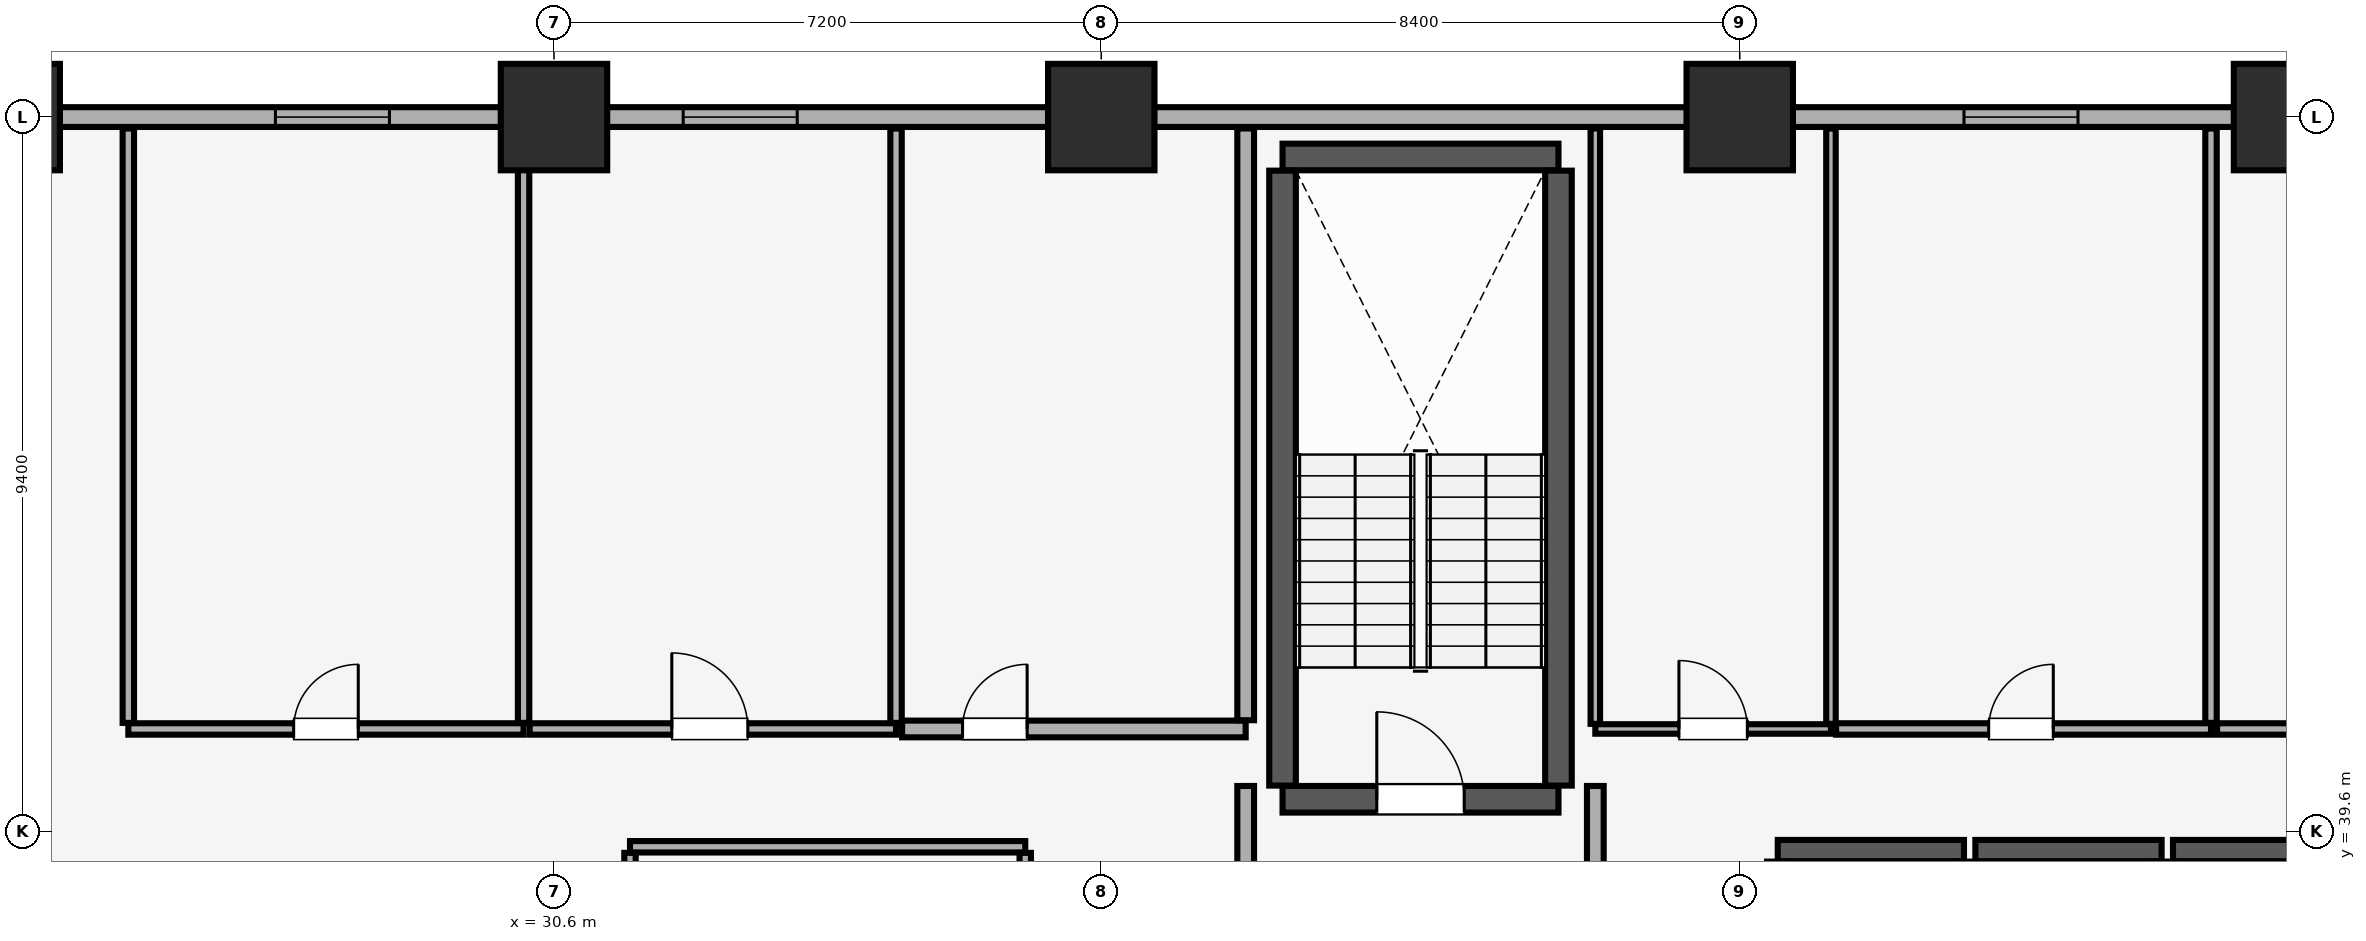
"""IFC4 building model, lengths in metres.
Left out: names, types, materials, properties, quantities, classifications, styles, units other than length and angle.
Written with IfcOpenShell. Run it as: python <this file> out.ifc"""

import sys

from ifc_helpers import new_model, si_unit, direction, frame, frame_2d, origin, origin_2d, place, context, subcontext, project, spatial, rectangle, extrude, element, fill, save


model = new_model("IFC4")
c1 = context("Model", 3, precision=1e-05, world=origin(), true_north=direction((0.0, 1.0)))
c2 = subcontext(c1, "Body", "Model", "MODEL_VIEW")
j1 = project(units=[si_unit("LENGTHUNIT", "METRE"), si_unit("PLANEANGLEUNIT", "RADIAN")], contexts=[c1])
p1 = place(None, origin())
s1 = spatial("IfcSite", under=j1, at=p1, CompositionType="ELEMENT")
p2 = place(p1, origin())
s2 = spatial("IfcBuilding", under=s1, at=p2, CompositionType="ELEMENT")
p3 = place(p2, frame((0.0, 0.0, 35.15)))
s3 = spatial("IfcBuildingStorey", under=s2, at=p3, CompositionType="ELEMENT", Elevation=35.15)
for number, where, z_axis, x_axis in (
    (1, (23.4, 49.0, 0.0), (0.0, 0.0, 1.0), (1.0, 0.0, 0.0)),
    (2, (30.6, 49.0, 0.0), (0.0, 0.0, 1.0), (1.0, 0.0, 0.0)),
    (3, (37.8, 49.0, 0.0), (0.0, 0.0, 1.0), (1.0, 0.0, 0.0)),
    (4, (46.2, 49.0, 0.0), (0.0, 0.0, 1.0), (1.0, 0.0, 0.0)),
    (5, (53.4, 49.0, 0.0), (0.0, 0.0, 1.0), (1.0, 0.0, 0.0)),
):
    element("IfcColumn", number, at=place(p3, frame(where, z_axis=z_axis, x_axis=x_axis)), inside=s3, PredefinedType="COLUMN", context=c2, shape_type="SweptSolid", body=[
        extrude(rectangle(XDim=1.4, YDim=1.4, at=origin_2d()), origin(), (0.0, 0.0, 1.0), 3.51),
    ])
p4 = place(p3, frame((79.8, 49.0, 0.0), z_axis=(0.0, 0.0, 1.0), x_axis=(-1.0, 0.0, 0.0)))
e6 = element("IfcWall", 6, at=p4, inside=s3, PredefinedType="SOLIDWALL", context=c2, shape_type="SweptSolid", body=[
    extrude(rectangle(XDim=75.6, YDim=0.26, at=frame_2d((37.8, 0.0))), origin(), (0.0, 0.0, 1.0), 2.56),
])
p5 = place(p4, frame((72.565, 0.0, 0.85)))
e7 = element("IfcOpeningElement", 7, at=p5, cuts=e6, PredefinedType="OPENING", context=c2, shape_type="SweptSolid", body=[
    extrude(rectangle(XDim=1.5, YDim=1.4, at=frame_2d((0.75, 0.7))), frame((0.0, 0.14, 0.0), z_axis=(0.0, -1.0, 0.0), x_axis=(1.0, 0.0, 0.0)), (0.0, 0.0, 1.0), 0.28),
])
p6 = place(p4, frame((67.45, 0.0, 0.85)))
e8 = element("IfcOpeningElement", 8, at=p6, cuts=e6, PredefinedType="OPENING", context=c2, shape_type="SweptSolid", body=[
    extrude(rectangle(XDim=1.5, YDim=1.4, at=frame_2d((0.75, 0.7))), frame((0.0, 0.14, 0.0), z_axis=(0.0, -1.0, 0.0), x_axis=(1.0, 0.0, 0.0)), (0.0, 0.0, 1.0), 0.28),
])
p7 = place(p4, frame((6.65, 0.0, 0.85)))
e9 = element("IfcOpeningElement", 9, at=p7, cuts=e6, PredefinedType="OPENING", context=c2, shape_type="SweptSolid", body=[
    extrude(rectangle(XDim=1.5, YDim=1.4, at=frame_2d((0.75, 0.7))), frame((0.0, 0.14, 0.0), z_axis=(0.0, -1.0, 0.0), x_axis=(1.0, 0.0, 0.0)), (0.0, 0.0, 1.0), 0.28),
])
p8 = place(p4, frame((1.535, 0.0, 0.85)))
e10 = element("IfcOpeningElement", 10, at=p8, cuts=e6, PredefinedType="OPENING", context=c2, shape_type="SweptSolid", body=[
    extrude(rectangle(XDim=1.5, YDim=1.4, at=frame_2d((0.75, 0.7))), frame((0.0, 0.14, 0.0), z_axis=(0.0, -1.0, 0.0), x_axis=(1.0, 0.0, 0.0)), (0.0, 0.0, 1.0), 0.28),
])
p9 = place(p4, frame((51.365, 0.0, 0.9)))
e11 = element("IfcOpeningElement", 11, at=p9, cuts=e6, PredefinedType="OPENING", context=c2, shape_type="SweptSolid", body=[
    extrude(rectangle(XDim=1.5, YDim=1.4, at=frame_2d((0.75, 0.7))), frame((0.0, 0.14, 0.0), z_axis=(0.0, -1.0, 0.0), x_axis=(1.0, 0.0, 0.0)), (0.0, 0.0, 1.0), 0.28),
])
p10 = place(p4, frame((46.0, 0.0, 0.9)))
e12 = element("IfcOpeningElement", 12, at=p10, cuts=e6, PredefinedType="OPENING", context=c2, shape_type="SweptSolid", body=[
    extrude(rectangle(XDim=1.5, YDim=1.4, at=frame_2d((0.75, 0.7))), frame((0.0, 0.14, 0.0), z_axis=(0.0, -1.0, 0.0), x_axis=(1.0, 0.0, 0.0)), (0.0, 0.0, 1.0), 0.28),
])
p11 = place(p4, frame((29.15, 0.0, 0.9)))
e13 = element("IfcOpeningElement", 13, at=p11, cuts=e6, PredefinedType="OPENING", context=c2, shape_type="SweptSolid", body=[
    extrude(rectangle(XDim=1.5, YDim=1.4, at=frame_2d((0.75, 0.7))), frame((0.0, 0.14, 0.0), z_axis=(0.0, -1.0, 0.0), x_axis=(1.0, 0.0, 0.0)), (0.0, 0.0, 1.0), 0.28),
])
p12 = place(p4, frame((23.485, 0.0, 0.9)))
e14 = element("IfcOpeningElement", 14, at=p12, cuts=e6, PredefinedType="OPENING", context=c2, shape_type="SweptSolid", body=[
    extrude(rectangle(XDim=1.5, YDim=1.4, at=frame_2d((0.75, 0.7))), frame((0.0, 0.14, 0.0), z_axis=(0.0, -1.0, 0.0), x_axis=(1.0, 0.0, 0.0)), (0.0, 0.0, 1.0), 0.28),
])
p13 = place(p3, frame((40.185, 40.025, 0.0), z_axis=(0.0, 0.0, 1.0), x_axis=(1.0, 0.0, 0.0)))
e15 = element("IfcWall", 15, at=p13, inside=s3, PredefinedType="SHEAR", context=c2, shape_type="SweptSolid", body=[
    extrude(rectangle(XDim=3.63, YDim=0.35, at=frame_2d((1.815, 0.0))), origin(), (0.0, 0.0, 1.0), 3.51),
])
p14 = place(p13, frame((1.24, 0.0, 0.0)))
e16 = element("IfcOpeningElement", 16, at=p14, cuts=e15, PredefinedType="OPENING", context=c2, shape_type="SweptSolid", body=[
    extrude(rectangle(XDim=1.15, YDim=2.15, at=frame_2d((0.575, 1.075))), frame((0.0, 0.185, 0.0), z_axis=(0.0, -1.0, 0.0), x_axis=(1.0, 0.0, 0.0)), (0.0, 0.0, 1.0), 0.37),
])
p15 = place(p3, frame((40.185, 48.475, 0.0), z_axis=(0.0, 0.0, 1.0), x_axis=(1.0, 0.0, 0.0)))
e17 = element("IfcWall", 17, at=p15, inside=s3, PredefinedType="SHEAR", context=c2, shape_type="SweptSolid", body=[
    extrude(rectangle(XDim=3.63, YDim=0.35, at=frame_2d((1.815, 0.0))), origin(), (0.0, 0.0, 1.0), 3.51),
])
for number, where, z_axis, x_axis in (
    (18, (40.185, 40.205, 0.0), (0.0, 0.0, 1.0), (0.0, 1.0, 0.0)),
    (19, (43.815, 40.205, 0.0), (0.0, 0.0, 1.0), (0.0, 1.0, 0.0)),
):
    element("IfcWall", number, at=place(p3, frame(where, z_axis=z_axis, x_axis=x_axis)), inside=s3, PredefinedType="SHEAR", context=c2, shape_type="SweptSolid", body=[
        extrude(rectangle(XDim=8.09, YDim=0.35, at=frame_2d((4.045, 0.0))), origin(), (0.0, 0.0, 1.0), 3.51),
    ])
p16 = place(p3, frame((46.7, 39.35, 0.0), z_axis=(0.0, 0.0, 1.0), x_axis=(1.0, 0.0, 0.0)))
e20 = element("IfcWall", 20, at=p16, inside=s3, PredefinedType="SHEAR", context=c2, shape_type="SweptSolid", body=[
    extrude(rectangle(XDim=2.45, YDim=0.28, at=frame_2d((1.225, 0.0))), origin(), (0.0, 0.0, 1.0), 3.51),
])
for number, where, z_axis, x_axis in (
    (21, (46.7, 37.145, 0.0), (0.0, 0.0, 1.0), (0.0, 1.0, 0.0)),
    (22, (49.15, 37.145, 0.0), (0.0, 0.0, 1.0), (0.0, 1.0, 0.0)),
):
    element("IfcWall", number, at=place(p3, frame(where, z_axis=z_axis, x_axis=x_axis)), inside=s3, PredefinedType="SHEAR", context=c2, shape_type="SweptSolid", body=[
        extrude(rectangle(XDim=2.06, YDim=0.28, at=frame_2d((1.03, 0.0))), origin(), (0.0, 0.0, 1.0), 3.51),
    ])
p17 = place(p3, frame((49.3, 39.35, 0.0), z_axis=(0.0, 0.0, 1.0), x_axis=(1.0, 0.0, 0.0)))
e23 = element("IfcWall", 23, at=p17, inside=s3, PredefinedType="SHEAR", context=c2, shape_type="SweptSolid", body=[
    extrude(rectangle(XDim=2.45, YDim=0.28, at=frame_2d((1.225, 0.0))), origin(), (0.0, 0.0, 1.0), 3.51),
])
p18 = place(p3, frame((51.75, 37.145, 0.0), z_axis=(0.0, 0.0, 1.0), x_axis=(0.0, 1.0, 0.0)))
e24 = element("IfcWall", 24, at=p18, inside=s3, PredefinedType="SHEAR", context=c2, shape_type="SweptSolid", body=[
    extrude(rectangle(XDim=2.06, YDim=0.28, at=frame_2d((1.03, 0.0))), origin(), (0.0, 0.0, 1.0), 3.51),
])
p19 = place(p3, frame((51.9, 39.35, 0.0), z_axis=(0.0, 0.0, 1.0), x_axis=(1.0, 0.0, 0.0)))
e25 = element("IfcWall", 25, at=p19, inside=s3, PredefinedType="SHEAR", context=c2, shape_type="SweptSolid", body=[
    extrude(rectangle(XDim=2.59, YDim=0.28, at=frame_2d((1.295, 0.0))), origin(), (0.0, 0.0, 1.0), 3.51),
])
for number, where, z_axis, x_axis in (
    (26, (39.7, 34.415, 0.0), (0.0, 0.0, 1.0), (0.0, 1.0, 0.0)),
    (27, (44.3, 34.415, 0.0), (0.0, 0.0, 1.0), (0.0, 1.0, 0.0)),
):
    element("IfcWall", number, at=place(p3, frame(where, z_axis=z_axis, x_axis=x_axis)), inside=s3, PredefinedType="PARTITIONING", context=c2, shape_type="SweptSolid", body=[
        extrude(rectangle(XDim=5.785, YDim=0.22, at=frame_2d((2.893, 0.0))), origin(), (0.0, 0.0, 1.0), 3.51),
    ])
p20 = place(p3, frame((31.6, 39.4, 0.0), z_axis=(0.0, 0.0, 1.0), x_axis=(1.0, 0.0, 0.0)))
e28 = element("IfcWall", 28, at=p20, inside=s3, PredefinedType="PARTITIONING", context=c2, shape_type="SweptSolid", body=[
    extrude(rectangle(XDim=5.2, YDim=0.15, at=frame_2d((2.6, 0.0))), origin(), (0.0, 0.0, 1.0), 3.51),
])
for number, where, z_axis, x_axis in (
    (29, (31.6, 34.38, 0.0), (0.0, 0.0, 1.0), (0.0, 1.0, 0.0)),
    (30, (36.8, 34.38, 0.0), (0.0, 0.0, 1.0), (0.0, 1.0, 0.0)),
):
    element("IfcWall", number, at=place(p3, frame(where, z_axis=z_axis, x_axis=x_axis)), inside=s3, PredefinedType="PARTITIONING", context=c2, shape_type="SweptSolid", body=[
        extrude(rectangle(XDim=4.94, YDim=0.15, at=frame_2d((2.47, 0.0))), origin(), (0.0, 0.0, 1.0), 3.51),
    ])
p21 = place(p3, frame((25.0, 40.95, 0.0), z_axis=(0.0, 0.0, 1.0), x_axis=(1.0, 0.0, 0.0)))
e31 = element("IfcWall", 31, at=p21, inside=s3, PredefinedType="PARTITIONING", context=c2, shape_type="SweptSolid", body=[
    extrude(rectangle(XDim=5.2, YDim=0.15, at=frame_2d((2.6, 0.0))), origin(), (0.0, 0.0, 1.0), 3.51),
])
p22 = place(p21, frame((2.175, 0.0, 0.0)))
e32 = element("IfcOpeningElement", 32, at=p22, cuts=e31, PredefinedType="OPENING", context=c2, shape_type="SweptSolid", body=[
    extrude(rectangle(XDim=0.85, YDim=2.1, at=frame_2d((0.425, 1.05))), frame((0.0, 0.085, 0.0), z_axis=(0.0, -1.0, 0.0), x_axis=(1.0, 0.0, 0.0)), (0.0, 0.0, 1.0), 0.17),
])
for number, where, z_axis, x_axis in (
    (33, (25.0, 41.03, 0.0), (0.0, 0.0, 1.0), (0.0, 1.0, 0.0)),
    (34, (30.2, 41.03, 0.0), (0.0, 0.0, 1.0), (0.0, 1.0, 0.0)),
):
    element("IfcWall", number, at=place(p3, frame(where, z_axis=z_axis, x_axis=x_axis)), inside=s3, PredefinedType="PARTITIONING", context=c2, shape_type="SweptSolid", body=[
        extrude(rectangle(XDim=7.82, YDim=0.15, at=frame_2d((3.91, 0.0))), origin(), (0.0, 0.0, 1.0), 3.51),
    ])
p23 = place(p3, frame((30.28, 40.95, 0.0), z_axis=(0.0, 0.0, 1.0), x_axis=(1.0, 0.0, 0.0)))
e35 = element("IfcWall", 35, at=p23, inside=s3, PredefinedType="PARTITIONING", context=c2, shape_type="SweptSolid", body=[
    extrude(rectangle(XDim=4.82, YDim=0.15, at=frame_2d((2.41, 0.0))), origin(), (0.0, 0.0, 1.0), 3.51),
])
p24 = place(p23, frame((1.87, 0.0, 0.0)))
e36 = element("IfcOpeningElement", 36, at=p24, cuts=e35, PredefinedType="OPENING", context=c2, shape_type="SweptSolid", body=[
    extrude(rectangle(XDim=1.0, YDim=2.15, at=frame_2d((0.5, 1.075))), frame((0.0, 0.085, 0.0), z_axis=(0.0, -1.0, 0.0), x_axis=(1.0, 0.0, 0.0)), (0.0, 0.0, 1.0), 0.17),
])
p25 = place(p3, frame((35.1, 41.03, 0.0), z_axis=(0.0, 0.0, 1.0), x_axis=(0.0, 1.0, 0.0)))
e37 = element("IfcWall", 37, at=p25, inside=s3, PredefinedType="PARTITIONING", context=c2, shape_type="SweptSolid", body=[
    extrude(rectangle(XDim=7.82, YDim=0.15, at=frame_2d((3.91, 0.0))), origin(), (0.0, 0.0, 1.0), 3.51),
])
p26 = place(p3, frame((35.18, 40.95, 0.0), z_axis=(0.0, 0.0, 1.0), x_axis=(1.0, 0.0, 0.0)))
e38 = element("IfcWall", 38, at=p26, inside=s3, PredefinedType="PARTITIONING", context=c2, shape_type="SweptSolid", body=[
    extrude(rectangle(XDim=4.52, YDim=0.22, at=frame_2d((2.26, 0.0))), origin(), (0.0, 0.0, 1.0), 3.51),
])
p27 = place(p26, frame((0.795, 0.0, 0.0)))
e39 = element("IfcOpeningElement", 39, at=p27, cuts=e38, PredefinedType="OPENING", context=c2, shape_type="SweptSolid", body=[
    extrude(rectangle(XDim=0.85, YDim=2.1, at=frame_2d((0.425, 1.05))), frame((0.0, 0.12, 0.0), z_axis=(0.0, -1.0, 0.0), x_axis=(1.0, 0.0, 0.0)), (0.0, 0.0, 1.0), 0.24),
])
p28 = place(p3, frame((39.7, 41.065, 0.0), z_axis=(0.0, 0.0, 1.0), x_axis=(0.0, 1.0, 0.0)))
e40 = element("IfcWall", 40, at=p28, inside=s3, PredefinedType="PARTITIONING", context=c2, shape_type="SweptSolid", body=[
    extrude(rectangle(XDim=7.785, YDim=0.22, at=frame_2d((3.893, 0.0))), origin(), (0.0, 0.0, 1.0), 3.51),
])
p29 = place(p3, frame((44.3, 40.95, 0.0), z_axis=(0.0, 0.0, 1.0), x_axis=(1.0, 0.0, 0.0)))
e41 = element("IfcWall", 41, at=p29, inside=s3, PredefinedType="PARTITIONING", context=c2, shape_type="SweptSolid", body=[
    extrude(rectangle(XDim=3.1, YDim=0.125, at=frame_2d((1.55, 0.0))), origin(), (0.0, 0.0, 1.0), 3.51),
])
p30 = place(p29, frame((1.1, 0.0, 0.0)))
e42 = element("IfcOpeningElement", 42, at=p30, cuts=e41, PredefinedType="OPENING", context=c2, shape_type="SweptSolid", body=[
    extrude(rectangle(XDim=0.9, YDim=2.1, at=frame_2d((0.45, 1.05))), frame((0.0, 0.073, 0.0), z_axis=(0.0, -1.0, 0.0), x_axis=(1.0, 0.0, 0.0)), (0.0, 0.0, 1.0), 0.145),
])
for number, where, z_axis, x_axis in (
    (43, (44.3, 41.018, 0.0), (0.0, 0.0, 1.0), (0.0, 1.0, 0.0)),
    (44, (47.4, 41.018, 0.0), (0.0, 0.0, 1.0), (0.0, 1.0, 0.0)),
):
    element("IfcWall", number, at=place(p3, frame(where, z_axis=z_axis, x_axis=x_axis)), inside=s3, PredefinedType="PARTITIONING", context=c2, shape_type="SweptSolid", body=[
        extrude(rectangle(XDim=7.833, YDim=0.125, at=frame_2d((3.916, 0.0))), origin(), (0.0, 0.0, 1.0), 3.51),
    ])
p31 = place(p3, frame((47.468, 40.95, 0.0), z_axis=(0.0, 0.0, 1.0), x_axis=(1.0, 0.0, 0.0)))
e45 = element("IfcWall", 45, at=p31, inside=s3, PredefinedType="PARTITIONING", context=c2, shape_type="SweptSolid", body=[
    extrude(rectangle(XDim=4.932, YDim=0.15, at=frame_2d((2.466, 0.0))), origin(), (0.0, 0.0, 1.0), 3.51),
])
p32 = place(p31, frame((2.008, 0.0, 0.0)))
e46 = element("IfcOpeningElement", 46, at=p32, cuts=e45, PredefinedType="OPENING", context=c2, shape_type="SweptSolid", body=[
    extrude(rectangle(XDim=0.85, YDim=2.1, at=frame_2d((0.425, 1.05))), frame((0.0, 0.085, 0.0), z_axis=(0.0, -1.0, 0.0), x_axis=(1.0, 0.0, 0.0)), (0.0, 0.0, 1.0), 0.17),
])
p33 = place(p3, frame((52.4, 41.03, 0.0), z_axis=(0.0, 0.0, 1.0), x_axis=(0.0, 1.0, 0.0)))
e47 = element("IfcWall", 47, at=p33, inside=s3, PredefinedType="PARTITIONING", context=c2, shape_type="SweptSolid", body=[
    extrude(rectangle(XDim=7.82, YDim=0.15, at=frame_2d((3.91, 0.0))), origin(), (0.0, 0.0, 1.0), 3.51),
])
p34 = place(p3, frame((52.48, 40.95, 0.0), z_axis=(0.0, 0.0, 1.0), x_axis=(1.0, 0.0, 0.0)))
e48 = element("IfcWall", 48, at=p34, inside=s3, PredefinedType="PARTITIONING", context=c2, shape_type="SweptSolid", body=[
    extrude(rectangle(XDim=5.02, YDim=0.15, at=frame_2d((2.51, 0.0))), origin(), (0.0, 0.0, 1.0), 3.51),
])
p35 = place(p34, frame((2.045, 0.0, 0.0)))
e49 = element("IfcOpeningElement", 49, at=p35, cuts=e48, PredefinedType="OPENING", context=c2, shape_type="SweptSolid", body=[
    extrude(rectangle(XDim=0.85, YDim=2.1, at=frame_2d((0.425, 1.05))), frame((0.0, 0.085, 0.0), z_axis=(0.0, -1.0, 0.0), x_axis=(1.0, 0.0, 0.0)), (0.0, 0.0, 1.0), 0.17),
])
p36 = place(p9, origin())
e50 = element("IfcWindow", 50, at=p36, inside=s3, PartitioningType="SINGLE_PANEL", PredefinedType="WINDOW", context=c2, shape_type="SweptSolid", body=[
    extrude(rectangle(XDim=1.5, YDim=1.4, at=frame_2d((0.75, 0.7))), frame((0.0, 0.03, 0.0), z_axis=(0.0, -1.0, 0.0), x_axis=(1.0, 0.0, 0.0)), (0.0, 0.0, 1.0), 0.06),
])
fill(e11, e50)
p37 = place(p10, origin())
e51 = element("IfcWindow", 51, at=p37, inside=s3, PartitioningType="SINGLE_PANEL", PredefinedType="WINDOW", context=c2, shape_type="SweptSolid", body=[
    extrude(rectangle(XDim=1.5, YDim=1.4, at=frame_2d((0.75, 0.7))), frame((0.0, 0.03, 0.0), z_axis=(0.0, -1.0, 0.0), x_axis=(1.0, 0.0, 0.0)), (0.0, 0.0, 1.0), 0.06),
])
fill(e12, e51)
p38 = place(p11, origin())
e52 = element("IfcWindow", 52, at=p38, inside=s3, PartitioningType="SINGLE_PANEL", PredefinedType="WINDOW", context=c2, shape_type="SweptSolid", body=[
    extrude(rectangle(XDim=1.5, YDim=1.4, at=frame_2d((0.75, 0.7))), frame((0.0, 0.03, 0.0), z_axis=(0.0, -1.0, 0.0), x_axis=(1.0, 0.0, 0.0)), (0.0, 0.0, 1.0), 0.06),
])
fill(e13, e52)
p39 = place(p14, origin())
e53 = element("IfcDoor", 53, at=p39, inside=s3, OperationType="SINGLE_SWING_LEFT", PredefinedType="DOOR", context=c2, shape_type="SweptSolid", body=[
    extrude(rectangle(XDim=1.15, YDim=2.15, at=frame_2d((0.575, 1.075))), frame((0.0, 0.025, 0.0), z_axis=(0.0, -1.0, 0.0), x_axis=(1.0, 0.0, 0.0)), (0.0, 0.0, 1.0), 0.05),
])
fill(e16, e53)
p40 = place(p22, origin())
e54 = element("IfcDoor", 54, at=p40, inside=s3, OperationType="SINGLE_SWING_RIGHT", PredefinedType="DOOR", context=c2, shape_type="SweptSolid", body=[
    extrude(rectangle(XDim=0.85, YDim=2.1, at=frame_2d((0.425, 1.05))), frame((0.0, 0.025, 0.0), z_axis=(0.0, -1.0, 0.0), x_axis=(1.0, 0.0, 0.0)), (0.0, 0.0, 1.0), 0.05),
])
fill(e32, e54)
p41 = place(p24, origin())
e55 = element("IfcDoor", 55, at=p41, inside=s3, OperationType="SINGLE_SWING_LEFT", PredefinedType="DOOR", context=c2, shape_type="SweptSolid", body=[
    extrude(rectangle(XDim=1.0, YDim=2.15, at=frame_2d((0.5, 1.075))), frame((0.0, 0.025, 0.0), z_axis=(0.0, -1.0, 0.0), x_axis=(1.0, 0.0, 0.0)), (0.0, 0.0, 1.0), 0.05),
])
fill(e36, e55)
p42 = place(p27, origin())
e56 = element("IfcDoor", 56, at=p42, inside=s3, OperationType="SINGLE_SWING_RIGHT", PredefinedType="DOOR", context=c2, shape_type="SweptSolid", body=[
    extrude(rectangle(XDim=0.85, YDim=2.1, at=frame_2d((0.425, 1.05))), frame((0.0, 0.025, 0.0), z_axis=(0.0, -1.0, 0.0), x_axis=(1.0, 0.0, 0.0)), (0.0, 0.0, 1.0), 0.05),
])
fill(e39, e56)
p43 = place(p30, origin())
e57 = element("IfcDoor", 57, at=p43, inside=s3, OperationType="SINGLE_SWING_LEFT", PredefinedType="DOOR", context=c2, shape_type="SweptSolid", body=[
    extrude(rectangle(XDim=0.9, YDim=2.1, at=frame_2d((0.45, 1.05))), frame((0.0, 0.025, 0.0), z_axis=(0.0, -1.0, 0.0), x_axis=(1.0, 0.0, 0.0)), (0.0, 0.0, 1.0), 0.05),
])
fill(e42, e57)
p44 = place(p32, origin())
e58 = element("IfcDoor", 58, at=p44, inside=s3, OperationType="SINGLE_SWING_RIGHT", PredefinedType="DOOR", context=c2, shape_type="SweptSolid", body=[
    extrude(rectangle(XDim=0.85, YDim=2.1, at=frame_2d((0.425, 1.05))), frame((0.0, 0.025, 0.0), z_axis=(0.0, -1.0, 0.0), x_axis=(1.0, 0.0, 0.0)), (0.0, 0.0, 1.0), 0.05),
])
fill(e46, e58)
save(model, sys.argv[1])
